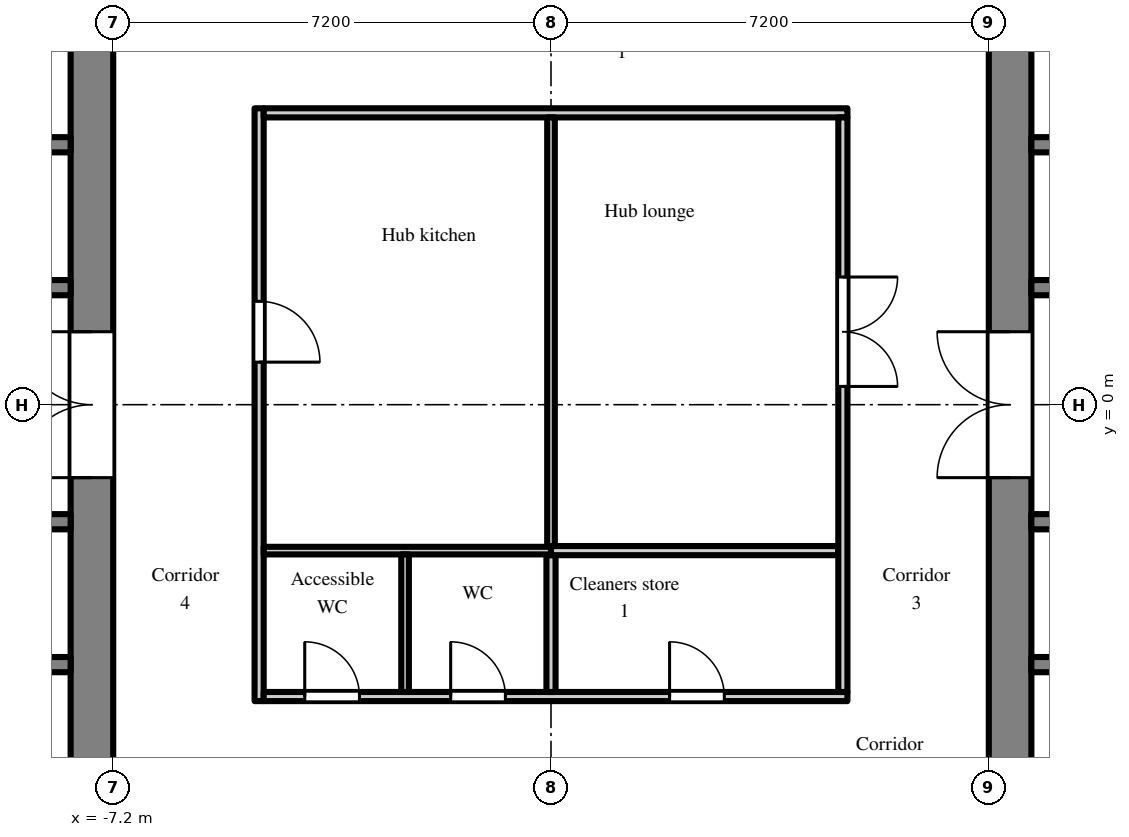
"""IFC4 building model, lengths in metres.
Left out: names, types, materials, properties, quantities, classifications, styles, units other than length and angle.
Written with IfcOpenShell. Run it as: python <this file> out.ifc"""

import sys

from ifc_helpers import new_model, si_unit, direction, frame, frame_2d, origin, place, context, subcontext, project, spatial, rectangle, extrude, element, fill, save


model = new_model("IFC4")
c1 = context("Model", 3, precision=1e-05, world=origin(), true_north=direction((0.0, 1.0)))
c2 = subcontext(c1, "Body", "Model", "MODEL_VIEW")
j1 = project(units=[si_unit("LENGTHUNIT", "METRE"), si_unit("PLANEANGLEUNIT", "RADIAN")], contexts=[c1])
p1 = place(None, origin())
s1 = spatial("IfcSite", under=j1, at=p1, CompositionType="ELEMENT")
p2 = place(p1, origin())
s2 = spatial("IfcBuilding", under=s1, at=p2, CompositionType="ELEMENT")
p3 = place(p2, frame((0.0, 0.0, 156.3)))
s3 = spatial("IfcBuildingStorey", under=s2, at=p3, CompositionType="ELEMENT", Elevation=156.3)
p4 = place(p3, frame((7.55, -7.2, 0.0), z_axis=(0.0, 0.0, 1.0), x_axis=(0.0, 1.0, 0.0)))
e1 = element("IfcWall", 1, at=p4, inside=s3, PredefinedType="SHEAR", context=c2, shape_type="SweptSolid", body=[
    extrude(rectangle(XDim=14.4, YDim=0.7, at=frame_2d((7.2, 0.0))), origin(), (0.0, 0.0, 1.0), 2.6),
])
p5 = place(p4, frame((6.0, 0.0, 0.0)))
e2 = element("IfcOpeningElement", 2, at=p5, cuts=e1, PredefinedType="OPENING", context=c2, shape_type="SweptSolid", body=[
    extrude(rectangle(XDim=2.4, YDim=2.2, at=frame_2d((1.2, 1.1))), frame((0.0, 0.36, 0.0), z_axis=(0.0, -1.0, 0.0), x_axis=(1.0, 0.0, 0.0)), (0.0, 0.0, 1.0), 0.72),
])
p6 = place(p3, frame((7.9, 1.925, 0.0), z_axis=(0.0, 0.0, 1.0), x_axis=(1.0, 0.0, 0.0)))
e3 = element("IfcWall", 3, at=p6, inside=s3, PredefinedType="SHEAR", context=c2, shape_type="SweptSolid", body=[
    extrude(rectangle(XDim=12.95, YDim=0.25, at=frame_2d((6.475, 0.0))), origin(), (0.0, 0.0, 1.0), 2.6),
])
p7 = place(p6, frame((4.825, 0.0, 0.0)))
e4 = element("IfcOpeningElement", 4, at=p7, cuts=e3, PredefinedType="OPENING", context=c2, shape_type="SweptSolid", body=[
    extrude(rectangle(XDim=1.1, YDim=2.1, at=frame_2d((0.55, 1.05))), frame((0.0, 0.135, 0.0), z_axis=(0.0, -1.0, 0.0), x_axis=(1.0, 0.0, 0.0)), (0.0, 0.0, 1.0), 0.27),
])
p8 = place(p6, frame((7.025, 0.0, 0.0)))
e5 = element("IfcOpeningElement", 5, at=p8, cuts=e3, PredefinedType="OPENING", context=c2, shape_type="SweptSolid", body=[
    extrude(rectangle(XDim=1.1, YDim=2.1, at=frame_2d((0.55, 1.05))), frame((0.0, 0.135, 0.0), z_axis=(0.0, -1.0, 0.0), x_axis=(1.0, 0.0, 0.0)), (0.0, 0.0, 1.0), 0.27),
])
p9 = place(p6, frame((9.225, 0.0, 0.0)))
e6 = element("IfcOpeningElement", 6, at=p9, cuts=e3, PredefinedType="OPENING", context=c2, shape_type="SweptSolid", body=[
    extrude(rectangle(XDim=1.1, YDim=2.1, at=frame_2d((0.55, 1.05))), frame((0.0, 0.135, 0.0), z_axis=(0.0, -1.0, 0.0), x_axis=(1.0, 0.0, 0.0)), (0.0, 0.0, 1.0), 0.27),
])
p10 = place(p6, frame((0.525, 0.0, 0.0)))
e7 = element("IfcOpeningElement", 7, at=p10, cuts=e3, PredefinedType="OPENING", context=c2, shape_type="SweptSolid", body=[
    extrude(rectangle(XDim=0.9, YDim=2.1, at=frame_2d((0.45, 1.05))), frame((0.0, 0.135, 0.0), z_axis=(0.0, -1.0, 0.0), x_axis=(1.0, 0.0, 0.0)), (0.0, 0.0, 1.0), 0.27),
])
p11 = place(p6, frame((2.625, 0.0, 0.0)))
e8 = element("IfcOpeningElement", 8, at=p11, cuts=e3, PredefinedType="OPENING", context=c2, shape_type="SweptSolid", body=[
    extrude(rectangle(XDim=1.1, YDim=2.1, at=frame_2d((0.55, 1.05))), frame((0.0, 0.135, 0.0), z_axis=(0.0, -1.0, 0.0), x_axis=(1.0, 0.0, 0.0)), (0.0, 0.0, 1.0), 0.27),
])
p12 = place(p6, frame((11.525, 0.0, 0.0)))
e9 = element("IfcOpeningElement", 9, at=p12, cuts=e3, PredefinedType="OPENING", context=c2, shape_type="SweptSolid", body=[
    extrude(rectangle(XDim=0.9, YDim=2.1, at=frame_2d((0.45, 1.05))), frame((0.0, 0.135, 0.0), z_axis=(0.0, -1.0, 0.0), x_axis=(1.0, 0.0, 0.0)), (0.0, 0.0, 1.0), 0.27),
])
p13 = place(p3, frame((7.9, 4.275, 0.0), z_axis=(0.0, 0.0, 1.0), x_axis=(1.0, 0.0, 0.0)))
e10 = element("IfcWall", 10, at=p13, inside=s3, PredefinedType="SHEAR", context=c2, shape_type="SweptSolid", body=[
    extrude(rectangle(XDim=1.95, YDim=0.25, at=frame_2d((0.975, 0.0))), origin(), (0.0, 0.0, 1.0), 2.6),
])
p14 = place(p3, frame((7.9, -1.925, 0.0), z_axis=(0.0, 0.0, 1.0), x_axis=(1.0, 0.0, 0.0)))
e11 = element("IfcWall", 11, at=p14, inside=s3, PredefinedType="SHEAR", context=c2, shape_type="SweptSolid", body=[
    extrude(rectangle(XDim=12.95, YDim=0.25, at=frame_2d((6.475, 0.0))), origin(), (0.0, 0.0, 1.0), 2.6),
])
p15 = place(p14, frame((0.525, 0.0, 0.0)))
e12 = element("IfcOpeningElement", 12, at=p15, cuts=e11, PredefinedType="OPENING", context=c2, shape_type="SweptSolid", body=[
    extrude(rectangle(XDim=0.9, YDim=2.1, at=frame_2d((0.45, 1.05))), frame((0.0, 0.135, 0.0), z_axis=(0.0, -1.0, 0.0), x_axis=(1.0, 0.0, 0.0)), (0.0, 0.0, 1.0), 0.27),
])
p16 = place(p14, frame((2.625, 0.0, 0.0)))
e13 = element("IfcOpeningElement", 13, at=p16, cuts=e11, PredefinedType="OPENING", context=c2, shape_type="SweptSolid", body=[
    extrude(rectangle(XDim=1.1, YDim=2.1, at=frame_2d((0.55, 1.05))), frame((0.0, 0.135, 0.0), z_axis=(0.0, -1.0, 0.0), x_axis=(1.0, 0.0, 0.0)), (0.0, 0.0, 1.0), 0.27),
])
p17 = place(p14, frame((8.225, 0.0, 0.0)))
e14 = element("IfcOpeningElement", 14, at=p17, cuts=e11, PredefinedType="OPENING", context=c2, shape_type="SweptSolid", body=[
    extrude(rectangle(XDim=0.9, YDim=2.1, at=frame_2d((0.45, 1.05))), frame((0.0, 0.135, 0.0), z_axis=(0.0, -1.0, 0.0), x_axis=(1.0, 0.0, 0.0)), (0.0, 0.0, 1.0), 0.27),
])
p18 = place(p3, frame((7.9, -4.275, 0.0), z_axis=(0.0, 0.0, 1.0), x_axis=(1.0, 0.0, 0.0)))
e15 = element("IfcWall", 15, at=p18, inside=s3, PredefinedType="SHEAR", context=c2, shape_type="SweptSolid", body=[
    extrude(rectangle(XDim=1.95, YDim=0.25, at=frame_2d((0.975, 0.0))), origin(), (0.0, 0.0, 1.0), 2.6),
])
p19 = place(p3, frame((-7.55, -7.2, 0.0), z_axis=(0.0, 0.0, 1.0), x_axis=(0.0, 1.0, 0.0)))
e16 = element("IfcWall", 16, at=p19, inside=s3, PredefinedType="SHEAR", context=c2, shape_type="SweptSolid", body=[
    extrude(rectangle(XDim=14.4, YDim=0.7, at=frame_2d((7.2, 0.0))), origin(), (0.0, 0.0, 1.0), 2.6),
])
p20 = place(p19, frame((6.0, 0.0, 0.0)))
e17 = element("IfcOpeningElement", 17, at=p20, cuts=e16, PredefinedType="OPENING", context=c2, shape_type="SweptSolid", body=[
    extrude(rectangle(XDim=2.4, YDim=2.2, at=frame_2d((1.2, 1.1))), frame((0.0, 0.36, 0.0), z_axis=(0.0, -1.0, 0.0), x_axis=(1.0, 0.0, 0.0)), (0.0, 0.0, 1.0), 0.72),
])
p21 = place(p3, frame((-7.9, 1.925, 0.0), z_axis=(0.0, 0.0, 1.0), x_axis=(-1.0, 0.0, 0.0)))
e18 = element("IfcWall", 18, at=p21, inside=s3, PredefinedType="SHEAR", context=c2, shape_type="SweptSolid", body=[
    extrude(rectangle(XDim=12.95, YDim=0.25, at=frame_2d((6.475, 0.0))), origin(), (0.0, 0.0, 1.0), 2.6),
])
p22 = place(p21, frame((4.825, 0.0, 0.0)))
e19 = element("IfcOpeningElement", 19, at=p22, cuts=e18, PredefinedType="OPENING", context=c2, shape_type="SweptSolid", body=[
    extrude(rectangle(XDim=1.1, YDim=2.1, at=frame_2d((0.55, 1.05))), frame((0.0, 0.135, 0.0), z_axis=(0.0, -1.0, 0.0), x_axis=(1.0, 0.0, 0.0)), (0.0, 0.0, 1.0), 0.27),
])
p23 = place(p21, frame((7.025, 0.0, 0.0)))
e20 = element("IfcOpeningElement", 20, at=p23, cuts=e18, PredefinedType="OPENING", context=c2, shape_type="SweptSolid", body=[
    extrude(rectangle(XDim=1.1, YDim=2.1, at=frame_2d((0.55, 1.05))), frame((0.0, 0.135, 0.0), z_axis=(0.0, -1.0, 0.0), x_axis=(1.0, 0.0, 0.0)), (0.0, 0.0, 1.0), 0.27),
])
p24 = place(p21, frame((9.225, 0.0, 0.0)))
e21 = element("IfcOpeningElement", 21, at=p24, cuts=e18, PredefinedType="OPENING", context=c2, shape_type="SweptSolid", body=[
    extrude(rectangle(XDim=1.1, YDim=2.1, at=frame_2d((0.55, 1.05))), frame((0.0, 0.135, 0.0), z_axis=(0.0, -1.0, 0.0), x_axis=(1.0, 0.0, 0.0)), (0.0, 0.0, 1.0), 0.27),
])
p25 = place(p21, frame((0.525, 0.0, 0.0)))
e22 = element("IfcOpeningElement", 22, at=p25, cuts=e18, PredefinedType="OPENING", context=c2, shape_type="SweptSolid", body=[
    extrude(rectangle(XDim=0.9, YDim=2.1, at=frame_2d((0.45, 1.05))), frame((0.0, 0.135, 0.0), z_axis=(0.0, -1.0, 0.0), x_axis=(1.0, 0.0, 0.0)), (0.0, 0.0, 1.0), 0.27),
])
p26 = place(p21, frame((2.625, 0.0, 0.0)))
e23 = element("IfcOpeningElement", 23, at=p26, cuts=e18, PredefinedType="OPENING", context=c2, shape_type="SweptSolid", body=[
    extrude(rectangle(XDim=1.1, YDim=2.1, at=frame_2d((0.55, 1.05))), frame((0.0, 0.135, 0.0), z_axis=(0.0, -1.0, 0.0), x_axis=(1.0, 0.0, 0.0)), (0.0, 0.0, 1.0), 0.27),
])
p27 = place(p21, frame((11.525, 0.0, 0.0)))
e24 = element("IfcOpeningElement", 24, at=p27, cuts=e18, PredefinedType="OPENING", context=c2, shape_type="SweptSolid", body=[
    extrude(rectangle(XDim=0.9, YDim=2.1, at=frame_2d((0.45, 1.05))), frame((0.0, 0.135, 0.0), z_axis=(0.0, -1.0, 0.0), x_axis=(1.0, 0.0, 0.0)), (0.0, 0.0, 1.0), 0.27),
])
p28 = place(p3, frame((-7.9, 4.275, 0.0), z_axis=(0.0, 0.0, 1.0), x_axis=(-1.0, 0.0, 0.0)))
e25 = element("IfcWall", 25, at=p28, inside=s3, PredefinedType="SHEAR", context=c2, shape_type="SweptSolid", body=[
    extrude(rectangle(XDim=1.95, YDim=0.25, at=frame_2d((0.975, 0.0))), origin(), (0.0, 0.0, 1.0), 2.6),
])
p29 = place(p3, frame((-7.9, -1.925, 0.0), z_axis=(0.0, 0.0, 1.0), x_axis=(-1.0, 0.0, 0.0)))
e26 = element("IfcWall", 26, at=p29, inside=s3, PredefinedType="SHEAR", context=c2, shape_type="SweptSolid", body=[
    extrude(rectangle(XDim=12.95, YDim=0.25, at=frame_2d((6.475, 0.0))), origin(), (0.0, 0.0, 1.0), 2.6),
])
p30 = place(p29, frame((0.525, 0.0, 0.0)))
e27 = element("IfcOpeningElement", 27, at=p30, cuts=e26, PredefinedType="OPENING", context=c2, shape_type="SweptSolid", body=[
    extrude(rectangle(XDim=0.9, YDim=2.1, at=frame_2d((0.45, 1.05))), frame((0.0, 0.135, 0.0), z_axis=(0.0, -1.0, 0.0), x_axis=(1.0, 0.0, 0.0)), (0.0, 0.0, 1.0), 0.27),
])
p31 = place(p29, frame((2.625, 0.0, 0.0)))
e28 = element("IfcOpeningElement", 28, at=p31, cuts=e26, PredefinedType="OPENING", context=c2, shape_type="SweptSolid", body=[
    extrude(rectangle(XDim=1.1, YDim=2.1, at=frame_2d((0.55, 1.05))), frame((0.0, 0.135, 0.0), z_axis=(0.0, -1.0, 0.0), x_axis=(1.0, 0.0, 0.0)), (0.0, 0.0, 1.0), 0.27),
])
p32 = place(p29, frame((8.225, 0.0, 0.0)))
e29 = element("IfcOpeningElement", 29, at=p32, cuts=e26, PredefinedType="OPENING", context=c2, shape_type="SweptSolid", body=[
    extrude(rectangle(XDim=0.9, YDim=2.1, at=frame_2d((0.45, 1.05))), frame((0.0, 0.135, 0.0), z_axis=(0.0, -1.0, 0.0), x_axis=(1.0, 0.0, 0.0)), (0.0, 0.0, 1.0), 0.27),
])
p33 = place(p3, frame((-7.9, -4.275, 0.0), z_axis=(0.0, 0.0, 1.0), x_axis=(-1.0, 0.0, 0.0)))
e30 = element("IfcWall", 30, at=p33, inside=s3, PredefinedType="SHEAR", context=c2, shape_type="SweptSolid", body=[
    extrude(rectangle(XDim=1.95, YDim=0.25, at=frame_2d((0.975, 0.0))), origin(), (0.0, 0.0, 1.0), 2.6),
])
p34 = place(p3, frame((-4.8, -4.875, 0.0), z_axis=(0.0, 0.0, 1.0), x_axis=(0.0, 1.0, 0.0)))
e31 = element("IfcWall", 31, at=p34, inside=s3, PredefinedType="PARTITIONING", context=c2, shape_type="SweptSolid", body=[
    extrude(rectangle(XDim=9.75, YDim=0.15, at=frame_2d((4.875, 0.0))), origin(), (0.0, 0.0, 1.0), 2.6),
])
p35 = place(p34, frame((5.575, 0.0, 0.0)))
e32 = element("IfcOpeningElement", 32, at=p35, cuts=e31, PredefinedType="OPENING", context=c2, shape_type="SweptSolid", body=[
    extrude(rectangle(XDim=1.0, YDim=2.1, at=frame_2d((0.5, 1.05))), frame((0.0, 0.085, 0.0), z_axis=(0.0, -1.0, 0.0), x_axis=(1.0, 0.0, 0.0)), (0.0, 0.0, 1.0), 0.17),
])
p36 = place(p3, frame((-4.725, -4.8, 0.0), z_axis=(0.0, 0.0, 1.0), x_axis=(1.0, 0.0, 0.0)))
e33 = element("IfcWall", 33, at=p36, inside=s3, PredefinedType="PARTITIONING", context=c2, shape_type="SweptSolid", body=[
    extrude(rectangle(XDim=9.6, YDim=0.15, at=frame_2d((4.8, 0.0))), origin(), (0.0, 0.0, 1.0), 2.6),
])
p37 = place(p36, frame((0.675, 0.0, 0.0)))
e34 = element("IfcOpeningElement", 34, at=p37, cuts=e33, PredefinedType="OPENING", context=c2, shape_type="SweptSolid", body=[
    extrude(rectangle(XDim=0.9, YDim=2.1, at=frame_2d((0.45, 1.05))), frame((0.0, 0.085, 0.0), z_axis=(0.0, -1.0, 0.0), x_axis=(1.0, 0.0, 0.0)), (0.0, 0.0, 1.0), 0.17),
])
p38 = place(p36, frame((3.075, 0.0, 0.0)))
e35 = element("IfcOpeningElement", 35, at=p38, cuts=e33, PredefinedType="OPENING", context=c2, shape_type="SweptSolid", body=[
    extrude(rectangle(XDim=0.9, YDim=2.1, at=frame_2d((0.45, 1.05))), frame((0.0, 0.085, 0.0), z_axis=(0.0, -1.0, 0.0), x_axis=(1.0, 0.0, 0.0)), (0.0, 0.0, 1.0), 0.17),
])
p39 = place(p36, frame((6.675, 0.0, 0.0)))
e36 = element("IfcOpeningElement", 36, at=p39, cuts=e33, PredefinedType="OPENING", context=c2, shape_type="SweptSolid", body=[
    extrude(rectangle(XDim=0.9, YDim=2.1, at=frame_2d((0.45, 1.05))), frame((0.0, 0.085, 0.0), z_axis=(0.0, -1.0, 0.0), x_axis=(1.0, 0.0, 0.0)), (0.0, 0.0, 1.0), 0.17),
])
p40 = place(p3, frame((-4.725, -2.4, 0.0), z_axis=(0.0, 0.0, 1.0), x_axis=(1.0, 0.0, 0.0)))
e37 = element("IfcWall", 37, at=p40, inside=s3, PredefinedType="PARTITIONING", context=c2, shape_type="SweptSolid", body=[
    extrude(rectangle(XDim=4.725, YDim=0.125, at=frame_2d((2.363, 0.0))), origin(), (0.0, 0.0, 1.0), 2.6),
])
p41 = place(p3, frame((-4.725, 4.8, 0.0), z_axis=(0.0, 0.0, 1.0), x_axis=(1.0, 0.0, 0.0)))
e38 = element("IfcWall", 38, at=p41, inside=s3, PredefinedType="PARTITIONING", context=c2, shape_type="SweptSolid", body=[
    extrude(rectangle(XDim=9.6, YDim=0.15, at=frame_2d((4.8, 0.0))), origin(), (0.0, 0.0, 1.0), 2.6),
])
p42 = place(p3, frame((-2.4, -4.725, 0.0), z_axis=(0.0, 0.0, 1.0), x_axis=(0.0, 1.0, 0.0)))
e39 = element("IfcWall", 39, at=p42, inside=s3, PredefinedType="PARTITIONING", context=c2, shape_type="SweptSolid", body=[
    extrude(rectangle(XDim=2.263, YDim=0.125, at=frame_2d((1.131, 0.0))), origin(), (0.0, 0.0, 1.0), 2.6),
])
p43 = place(p3, frame((0.0, -4.725, 0.0), z_axis=(0.0, 0.0, 1.0), x_axis=(0.0, 1.0, 0.0)))
e40 = element("IfcWall", 40, at=p43, inside=s3, PredefinedType="PARTITIONING", context=c2, shape_type="SweptSolid", body=[
    extrude(rectangle(XDim=2.25, YDim=0.15, at=frame_2d((1.125, 0.0))), origin(), (0.0, 0.0, 1.0), 2.6),
])
p44 = place(p3, frame((0.0, -2.325, 0.0), z_axis=(0.0, 0.0, 1.0), x_axis=(0.0, 1.0, 0.0)))
e41 = element("IfcWall", 41, at=p44, inside=s3, PredefinedType="PARTITIONING", context=c2, shape_type="SweptSolid", body=[
    extrude(rectangle(XDim=7.05, YDim=0.125, at=frame_2d((3.525, 0.0))), origin(), (0.0, 0.0, 1.0), 2.6),
])
p45 = place(p3, frame((0.0, -2.4, 0.0), z_axis=(0.0, 0.0, 1.0), x_axis=(1.0, 0.0, 0.0)))
e42 = element("IfcWall", 42, at=p45, inside=s3, PredefinedType="PARTITIONING", context=c2, shape_type="SweptSolid", body=[
    extrude(rectangle(XDim=4.725, YDim=0.15, at=frame_2d((2.363, 0.0))), origin(), (0.0, 0.0, 1.0), 2.6),
])
p46 = place(p3, frame((4.8, -4.725, 0.0), z_axis=(0.0, 0.0, 1.0), x_axis=(0.0, 1.0, 0.0)))
e43 = element("IfcWall", 43, at=p46, inside=s3, PredefinedType="PARTITIONING", context=c2, shape_type="SweptSolid", body=[
    extrude(rectangle(XDim=9.45, YDim=0.15, at=frame_2d((4.725, 0.0))), origin(), (0.0, 0.0, 1.0), 2.6),
])
p47 = place(p46, frame((5.025, 0.0, 0.0)))
e44 = element("IfcOpeningElement", 44, at=p47, cuts=e43, PredefinedType="OPENING", context=c2, shape_type="SweptSolid", body=[
    extrude(rectangle(XDim=1.8, YDim=2.1, at=frame_2d((0.9, 1.05))), frame((0.0, 0.085, 0.0), z_axis=(0.0, -1.0, 0.0), x_axis=(1.0, 0.0, 0.0)), (0.0, 0.0, 1.0), 0.17),
])
p48 = place(p5, origin())
e45 = element("IfcDoor", 45, at=p48, inside=s3, OperationType="DOUBLE_DOOR_DOUBLE_SWING", PredefinedType="DOOR", context=c2, shape_type="SweptSolid", body=[
    extrude(rectangle(XDim=2.4, YDim=2.2, at=frame_2d((1.2, 1.1))), frame((0.0, 0.025, 0.0), z_axis=(0.0, -1.0, 0.0), x_axis=(1.0, 0.0, 0.0)), (0.0, 0.0, 1.0), 0.05),
])
fill(e2, e45)
p49 = place(p20, origin())
e46 = element("IfcDoor", 46, at=p49, inside=s3, OperationType="DOUBLE_DOOR_DOUBLE_SWING", PredefinedType="DOOR", context=c2, shape_type="SweptSolid", body=[
    extrude(rectangle(XDim=2.4, YDim=2.2, at=frame_2d((1.2, 1.1))), frame((0.0, 0.025, 0.0), z_axis=(0.0, -1.0, 0.0), x_axis=(1.0, 0.0, 0.0)), (0.0, 0.0, 1.0), 0.05),
])
fill(e17, e46)
p50 = place(p37, origin())
e47 = element("IfcDoor", 47, at=p50, inside=s3, OperationType="SINGLE_SWING_LEFT", PredefinedType="DOOR", context=c2, shape_type="SweptSolid", body=[
    extrude(rectangle(XDim=0.9, YDim=2.1, at=frame_2d((0.45, 1.05))), frame((0.0, 0.025, 0.0), z_axis=(0.0, -1.0, 0.0), x_axis=(1.0, 0.0, 0.0)), (0.0, 0.0, 1.0), 0.05),
])
fill(e34, e47)
p51 = place(p38, origin())
e48 = element("IfcDoor", 48, at=p51, inside=s3, OperationType="SINGLE_SWING_LEFT", PredefinedType="DOOR", context=c2, shape_type="SweptSolid", body=[
    extrude(rectangle(XDim=0.9, YDim=2.1, at=frame_2d((0.45, 1.05))), frame((0.0, 0.025, 0.0), z_axis=(0.0, -1.0, 0.0), x_axis=(1.0, 0.0, 0.0)), (0.0, 0.0, 1.0), 0.05),
])
fill(e35, e48)
p52 = place(p39, origin())
e49 = element("IfcDoor", 49, at=p52, inside=s3, OperationType="SINGLE_SWING_LEFT", PredefinedType="DOOR", context=c2, shape_type="SweptSolid", body=[
    extrude(rectangle(XDim=0.9, YDim=2.1, at=frame_2d((0.45, 1.05))), frame((0.0, 0.025, 0.0), z_axis=(0.0, -1.0, 0.0), x_axis=(1.0, 0.0, 0.0)), (0.0, 0.0, 1.0), 0.05),
])
fill(e36, e49)
p53 = place(p35, frame((1.0, 0.0, 0.0), z_axis=(0.0, 0.0, 1.0), x_axis=(-1.0, 0.0, 0.0)))
e50 = element("IfcDoor", 50, at=p53, inside=s3, OperationType="SINGLE_SWING_RIGHT", PredefinedType="DOOR", context=c2, shape_type="SweptSolid", body=[
    extrude(rectangle(XDim=1.0, YDim=2.1, at=frame_2d((0.5, 1.05))), frame((0.0, 0.025, 0.0), z_axis=(0.0, -1.0, 0.0), x_axis=(1.0, 0.0, 0.0)), (0.0, 0.0, 1.0), 0.05),
])
fill(e32, e50)
p54 = place(p47, frame((1.8, 0.0, 0.0), z_axis=(0.0, 0.0, 1.0), x_axis=(-1.0, 0.0, 0.0)))
e51 = element("IfcDoor", 51, at=p54, inside=s3, OperationType="DOUBLE_DOOR_DOUBLE_SWING", PredefinedType="DOOR", context=c2, shape_type="SweptSolid", body=[
    extrude(rectangle(XDim=1.8, YDim=2.1, at=frame_2d((0.9, 1.05))), frame((0.0, 0.025, 0.0), z_axis=(0.0, -1.0, 0.0), x_axis=(1.0, 0.0, 0.0)), (0.0, 0.0, 1.0), 0.05),
])
fill(e44, e51)
save(model, sys.argv[1])
